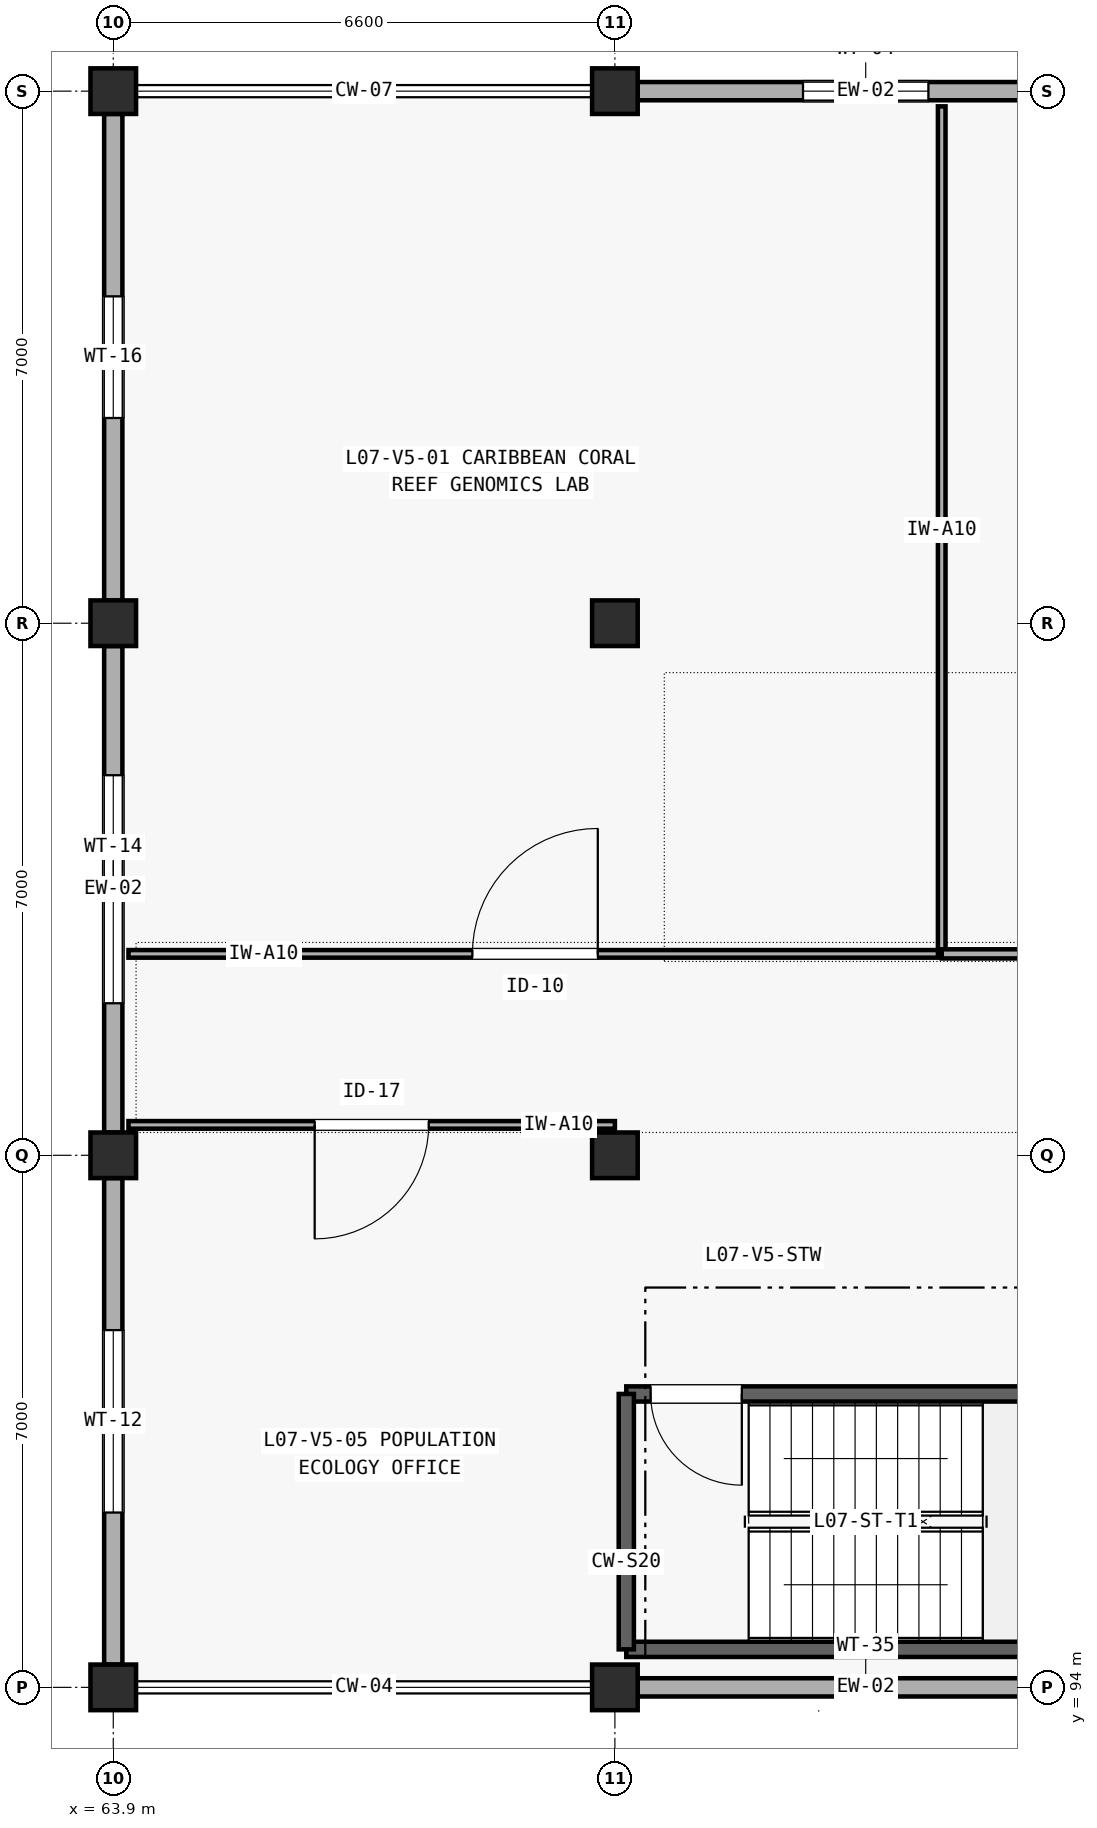
"""IFC4 building model, lengths in metres.
Left out: names, types, materials, properties, quantities, classifications, styles, units other than length and angle.
Written with IfcOpenShell. Run it as: python <this file> out.ifc"""

import sys

from ifc_helpers import new_model, si_unit, direction, frame, frame_2d, origin, origin_2d, place, context, subcontext, project, spatial, rectangle, extrude, element, fill, save


model = new_model("IFC4")
c1 = context("Model", 3, precision=1e-05, world=origin(), true_north=direction((0.0, 1.0)))
c2 = subcontext(c1, "Body", "Model", "MODEL_VIEW")
j1 = project(units=[si_unit("LENGTHUNIT", "METRE"), si_unit("PLANEANGLEUNIT", "RADIAN")], contexts=[c1])
p1 = place(None, origin())
s1 = spatial("IfcSite", under=j1, at=p1, CompositionType="ELEMENT")
p2 = place(p1, origin())
s2 = spatial("IfcBuilding", under=s1, at=p2, CompositionType="ELEMENT")
p3 = place(p2, frame((0.0, 0.0, 29.4)))
s3 = spatial("IfcBuildingStorey", under=s2, at=p3, CompositionType="ELEMENT", Elevation=29.4)
for number, where, z_axis, x_axis in (
    (1, (63.9, 94.0, 0.0), (0.0, 0.0, 1.0), (1.0, 0.0, 0.0)),
    (2, (63.9, 101.0, 0.0), (0.0, 0.0, 1.0), (1.0, 0.0, 0.0)),
    (3, (63.9, 108.0, 0.0), (0.0, 0.0, 1.0), (1.0, 0.0, 0.0)),
    (4, (63.9, 115.0, 0.0), (0.0, 0.0, 1.0), (1.0, 0.0, 0.0)),
    (5, (70.5, 94.0, 0.0), (0.0, 0.0, 1.0), (1.0, 0.0, 0.0)),
    (6, (70.5, 101.0, 0.0), (0.0, 0.0, 1.0), (1.0, 0.0, 0.0)),
    (7, (70.5, 108.0, 0.0), (0.0, 0.0, 1.0), (1.0, 0.0, 0.0)),
    (8, (70.5, 115.0, 0.0), (0.0, 0.0, 1.0), (1.0, 0.0, 0.0)),
):
    element("IfcColumn", number, at=place(p3, frame(where, z_axis=z_axis, x_axis=x_axis)), inside=s3, PredefinedType="COLUMN", context=c2, shape_type="SweptSolid", body=[
        extrude(rectangle(XDim=0.6, YDim=0.6, at=origin_2d()), origin(), (0.0, 0.0, 1.0), 4.2),
    ])
p4 = place(p3, frame((70.8, 94.0, 0.0), z_axis=(0.0, 0.0, 1.0), x_axis=(1.0, 0.0, 0.0)))
e9 = element("IfcWall", 9, at=p4, inside=s3, PredefinedType="SOLIDWALL", context=c2, shape_type="SweptSolid", body=[
    extrude(rectangle(XDim=6.0, YDim=0.24, at=frame_2d((3.0, 0.0))), origin(), (0.0, 0.0, 1.0), 3.135),
])
p5 = place(p4, frame((2.625, 0.0, 0.85)))
e10 = element("IfcOpeningElement", 10, at=p5, cuts=e9, PredefinedType="OPENING", context=c2, shape_type="SweptSolid", body=[
    extrude(rectangle(XDim=0.75, YDim=1.55, at=frame_2d((0.375, 0.775))), frame((0.0, 0.13, 0.0), z_axis=(0.0, -1.0, 0.0), x_axis=(1.0, 0.0, 0.0)), (0.0, 0.0, 1.0), 0.26),
])
p6 = place(p3, frame((70.8, 115.0, 0.0), z_axis=(0.0, 0.0, 1.0), x_axis=(1.0, 0.0, 0.0)))
e11 = element("IfcWall", 11, at=p6, inside=s3, PredefinedType="SOLIDWALL", context=c2, shape_type="SweptSolid", body=[
    extrude(rectangle(XDim=6.0, YDim=0.24, at=frame_2d((3.0, 0.0))), origin(), (0.0, 0.0, 1.0), 3.135),
])
p7 = place(p6, frame((2.175, 0.0, 0.85)))
e12 = element("IfcOpeningElement", 12, at=p7, cuts=e11, PredefinedType="OPENING", context=c2, shape_type="SweptSolid", body=[
    extrude(rectangle(XDim=1.65, YDim=1.35, at=frame_2d((0.825, 0.675))), frame((0.0, 0.13, 0.0), z_axis=(0.0, -1.0, 0.0), x_axis=(1.0, 0.0, 0.0)), (0.0, 0.0, 1.0), 0.26),
])
p8 = place(p3, frame((63.9, 94.3, 0.0), z_axis=(0.0, 0.0, 1.0), x_axis=(0.0, 1.0, 0.0)))
e13 = element("IfcWall", 13, at=p8, inside=s3, PredefinedType="SOLIDWALL", context=c2, shape_type="SweptSolid", body=[
    extrude(rectangle(XDim=6.4, YDim=0.24, at=frame_2d((3.2, 0.0))), origin(), (0.0, 0.0, 1.0), 3.565),
])
p9 = place(p8, frame((2.0, 0.0, 0.85)))
e14 = element("IfcOpeningElement", 14, at=p9, cuts=e13, PredefinedType="OPENING", context=c2, shape_type="SweptSolid", body=[
    extrude(rectangle(XDim=2.4, YDim=1.5, at=frame_2d((1.2, 0.75))), frame((0.0, 0.13, 0.0), z_axis=(0.0, -1.0, 0.0), x_axis=(1.0, 0.0, 0.0)), (0.0, 0.0, 1.0), 0.26),
])
p10 = place(p3, frame((63.9, 101.3, 0.0), z_axis=(0.0, 0.0, 1.0), x_axis=(0.0, 1.0, 0.0)))
e15 = element("IfcWall", 15, at=p10, inside=s3, PredefinedType="SOLIDWALL", context=c2, shape_type="SweptSolid", body=[
    extrude(rectangle(XDim=6.4, YDim=0.24, at=frame_2d((3.2, 0.0))), origin(), (0.0, 0.0, 1.0), 3.565),
])
p11 = place(p10, frame((1.7, 0.0, 0.85)))
e16 = element("IfcOpeningElement", 16, at=p11, cuts=e15, PredefinedType="OPENING", context=c2, shape_type="SweptSolid", body=[
    extrude(rectangle(XDim=3.0, YDim=1.5, at=frame_2d((1.5, 0.75))), frame((0.0, 0.13, 0.0), z_axis=(0.0, -1.0, 0.0), x_axis=(1.0, 0.0, 0.0)), (0.0, 0.0, 1.0), 0.26),
])
p12 = place(p3, frame((63.9, 108.3, 0.0), z_axis=(0.0, 0.0, 1.0), x_axis=(0.0, 1.0, 0.0)))
e17 = element("IfcWall", 17, at=p12, inside=s3, PredefinedType="SOLIDWALL", context=c2, shape_type="SweptSolid", body=[
    extrude(rectangle(XDim=6.4, YDim=0.24, at=frame_2d((3.2, 0.0))), origin(), (0.0, 0.0, 1.0), 3.565),
])
p13 = place(p12, frame((2.4, 0.0, 0.85)))
e18 = element("IfcOpeningElement", 18, at=p13, cuts=e17, PredefinedType="OPENING", context=c2, shape_type="SweptSolid", body=[
    extrude(rectangle(XDim=1.6, YDim=1.25, at=frame_2d((0.8, 0.625))), frame((0.0, 0.13, 0.0), z_axis=(0.0, -1.0, 0.0), x_axis=(1.0, 0.0, 0.0)), (0.0, 0.0, 1.0), 0.26),
])
p14 = place(p3, frame((70.65, 94.5, 0.0), z_axis=(0.0, 0.0, 1.0), x_axis=(1.0, 0.0, 0.0)))
e19 = element("IfcWall", 19, at=p14, inside=s3, PredefinedType="SHEAR", context=c2, shape_type="SweptSolid", body=[
    extrude(rectangle(XDim=6.3, YDim=0.2, at=frame_2d((3.15, 0.0))), origin(), (0.0, 0.0, 1.0), 4.2),
])
p15 = place(p3, frame((70.65, 97.86, 0.0), z_axis=(0.0, 0.0, 1.0), x_axis=(1.0, 0.0, 0.0)))
e20 = element("IfcWall", 20, at=p15, inside=s3, PredefinedType="SHEAR", context=c2, shape_type="SweptSolid", body=[
    extrude(rectangle(XDim=6.3, YDim=0.2, at=frame_2d((3.15, 0.0))), origin(), (0.0, 0.0, 1.0), 4.2),
])
p16 = place(p15, frame((0.32, 0.0, 0.0)))
e21 = element("IfcOpeningElement", 21, at=p16, cuts=e20, PredefinedType="OPENING", context=c2, shape_type="SweptSolid", body=[
    extrude(rectangle(XDim=1.2, YDim=2.15, at=frame_2d((0.6, 1.075))), frame((0.0, 0.11, 0.0), z_axis=(0.0, -1.0, 0.0), x_axis=(1.0, 0.0, 0.0)), (0.0, 0.0, 1.0), 0.22),
])
p17 = place(p3, frame((70.65, 94.5, 0.0), z_axis=(0.0, 0.0, 1.0), x_axis=(0.0, 1.0, 0.0)))
e22 = element("IfcWall", 22, at=p17, inside=s3, PredefinedType="SHEAR", context=c2, shape_type="SweptSolid", body=[
    extrude(rectangle(XDim=3.36, YDim=0.2, at=frame_2d((1.68, 0.0))), origin(), (0.0, 0.0, 1.0), 4.2),
])
p18 = place(p3, frame((64.1, 103.65, 0.0), z_axis=(0.0, 0.0, 1.0), x_axis=(1.0, 0.0, 0.0)))
e23 = element("IfcWall", 23, at=p18, inside=s3, PredefinedType="PARTITIONING", context=c2, shape_type="SweptSolid", body=[
    extrude(rectangle(XDim=10.7, YDim=0.1, at=frame_2d((5.35, 0.0))), origin(), (0.0, 0.0, 1.0), 3.9),
])
p19 = place(p18, frame((4.525, 0.0, 0.0)))
e24 = element("IfcOpeningElement", 24, at=p19, cuts=e23, PredefinedType="OPENING", context=c2, shape_type="SweptSolid", body=[
    extrude(rectangle(XDim=1.65, YDim=2.25, at=frame_2d((0.825, 1.125))), frame((0.0, 0.06, 0.0), z_axis=(0.0, -1.0, 0.0), x_axis=(1.0, 0.0, 0.0)), (0.0, 0.0, 1.0), 0.12),
])
p20 = place(p3, frame((74.8, 103.65, 0.0), z_axis=(0.0, 0.0, 1.0), x_axis=(0.0, 1.0, 0.0)))
e25 = element("IfcWall", 25, at=p20, inside=s3, PredefinedType="PARTITIONING", context=c2, shape_type="SweptSolid", body=[
    extrude(rectangle(XDim=11.15, YDim=0.1, at=frame_2d((5.575, 0.0))), origin(), (0.0, 0.0, 1.0), 3.582),
])
p21 = place(p3, frame((74.8, 103.65, 0.0), z_axis=(0.0, 0.0, 1.0), x_axis=(1.0, 0.0, 0.0)))
e26 = element("IfcWall", 26, at=p21, inside=s3, PredefinedType="PARTITIONING", context=c2, shape_type="SweptSolid", body=[
    extrude(rectangle(XDim=9.8, YDim=0.12, at=frame_2d((4.9, 0.0))), origin(), (0.0, 0.0, 1.0), 3.9),
])
p22 = place(p21, frame((4.025, 0.0, 0.0)))
e27 = element("IfcOpeningElement", 27, at=p22, cuts=e26, PredefinedType="OPENING", context=c2, shape_type="SweptSolid", body=[
    extrude(rectangle(XDim=1.75, YDim=2.25, at=frame_2d((0.875, 1.125))), frame((0.0, 0.07, 0.0), z_axis=(0.0, -1.0, 0.0), x_axis=(1.0, 0.0, 0.0)), (0.0, 0.0, 1.0), 0.14),
])
p23 = place(p3, frame((64.1, 101.4, 0.0), z_axis=(0.0, 0.0, 1.0), x_axis=(1.0, 0.0, 0.0)))
e28 = element("IfcWall", 28, at=p23, inside=s3, PredefinedType="PARTITIONING", context=c2, shape_type="SweptSolid", body=[
    extrude(rectangle(XDim=6.4, YDim=0.1, at=frame_2d((3.2, 0.0))), origin(), (0.0, 0.0, 1.0), 3.135),
])
p24 = place(p23, frame((2.45, 0.0, 0.0)))
e29 = element("IfcOpeningElement", 29, at=p24, cuts=e28, PredefinedType="OPENING", context=c2, shape_type="SweptSolid", body=[
    extrude(rectangle(XDim=1.5, YDim=2.15, at=frame_2d((0.75, 1.075))), frame((0.0, 0.06, 0.0), z_axis=(0.0, -1.0, 0.0), x_axis=(1.0, 0.0, 0.0)), (0.0, 0.0, 1.0), 0.12),
])
p25 = place(p5, origin())
e30 = element("IfcWindow", 30, at=p25, inside=s3, PartitioningType="SINGLE_PANEL", PredefinedType="WINDOW", context=c2, shape_type="SweptSolid", body=[
    extrude(rectangle(XDim=0.75, YDim=1.55, at=frame_2d((0.375, 0.775))), frame((0.0, 0.03, 0.0), z_axis=(0.0, -1.0, 0.0), x_axis=(1.0, 0.0, 0.0)), (0.0, 0.0, 1.0), 0.06),
])
fill(e10, e30)
p26 = place(p7, origin())
e31 = element("IfcWindow", 31, at=p26, inside=s3, PartitioningType="SINGLE_PANEL", PredefinedType="WINDOW", context=c2, shape_type="SweptSolid", body=[
    extrude(rectangle(XDim=1.65, YDim=1.35, at=frame_2d((0.825, 0.675))), frame((0.0, 0.03, 0.0), z_axis=(0.0, -1.0, 0.0), x_axis=(1.0, 0.0, 0.0)), (0.0, 0.0, 1.0), 0.06),
])
fill(e12, e31)
p27 = place(p9, origin())
e32 = element("IfcWindow", 32, at=p27, inside=s3, PartitioningType="SINGLE_PANEL", PredefinedType="WINDOW", context=c2, shape_type="SweptSolid", body=[
    extrude(rectangle(XDim=2.4, YDim=1.5, at=frame_2d((1.2, 0.75))), frame((0.0, 0.03, 0.0), z_axis=(0.0, -1.0, 0.0), x_axis=(1.0, 0.0, 0.0)), (0.0, 0.0, 1.0), 0.06),
])
fill(e14, e32)
p28 = place(p11, origin())
e33 = element("IfcWindow", 33, at=p28, inside=s3, PartitioningType="SINGLE_PANEL", PredefinedType="WINDOW", context=c2, shape_type="SweptSolid", body=[
    extrude(rectangle(XDim=3.0, YDim=1.5, at=frame_2d((1.5, 0.75))), frame((0.0, 0.03, 0.0), z_axis=(0.0, -1.0, 0.0), x_axis=(1.0, 0.0, 0.0)), (0.0, 0.0, 1.0), 0.06),
])
fill(e16, e33)
p29 = place(p13, origin())
e34 = element("IfcWindow", 34, at=p29, inside=s3, PartitioningType="SINGLE_PANEL", PredefinedType="WINDOW", context=c2, shape_type="SweptSolid", body=[
    extrude(rectangle(XDim=1.6, YDim=1.25, at=frame_2d((0.8, 0.625))), frame((0.0, 0.03, 0.0), z_axis=(0.0, -1.0, 0.0), x_axis=(1.0, 0.0, 0.0)), (0.0, 0.0, 1.0), 0.06),
])
fill(e18, e34)
p30 = place(p16, frame((1.2, 0.0, 0.0), z_axis=(0.0, 0.0, 1.0), x_axis=(-1.0, 0.0, 0.0)))
e35 = element("IfcDoor", 35, at=p30, inside=s3, OperationType="SINGLE_SWING_LEFT", PredefinedType="DOOR", context=c2, shape_type="SweptSolid", body=[
    extrude(rectangle(XDim=1.2, YDim=2.15, at=frame_2d((0.6, 1.075))), frame((0.0, 0.025, 0.0), z_axis=(0.0, -1.0, 0.0), x_axis=(1.0, 0.0, 0.0)), (0.0, 0.0, 1.0), 0.05),
])
fill(e21, e35)
p31 = place(p19, origin())
e36 = element("IfcDoor", 36, at=p31, inside=s3, OperationType="SINGLE_SWING_RIGHT", PredefinedType="DOOR", context=c2, shape_type="SweptSolid", body=[
    extrude(rectangle(XDim=1.65, YDim=2.25, at=frame_2d((0.825, 1.125))), frame((0.0, 0.025, 0.0), z_axis=(0.0, -1.0, 0.0), x_axis=(1.0, 0.0, 0.0)), (0.0, 0.0, 1.0), 0.05),
])
fill(e24, e36)
p32 = place(p24, frame((1.5, 0.0, 0.0), z_axis=(0.0, 0.0, 1.0), x_axis=(-1.0, 0.0, 0.0)))
e37 = element("IfcDoor", 37, at=p32, inside=s3, OperationType="SINGLE_SWING_RIGHT", PredefinedType="DOOR", context=c2, shape_type="SweptSolid", body=[
    extrude(rectangle(XDim=1.5, YDim=2.15, at=frame_2d((0.75, 1.075))), frame((0.0, 0.025, 0.0), z_axis=(0.0, -1.0, 0.0), x_axis=(1.0, 0.0, 0.0)), (0.0, 0.0, 1.0), 0.05),
])
fill(e29, e37)
save(model, sys.argv[1])
